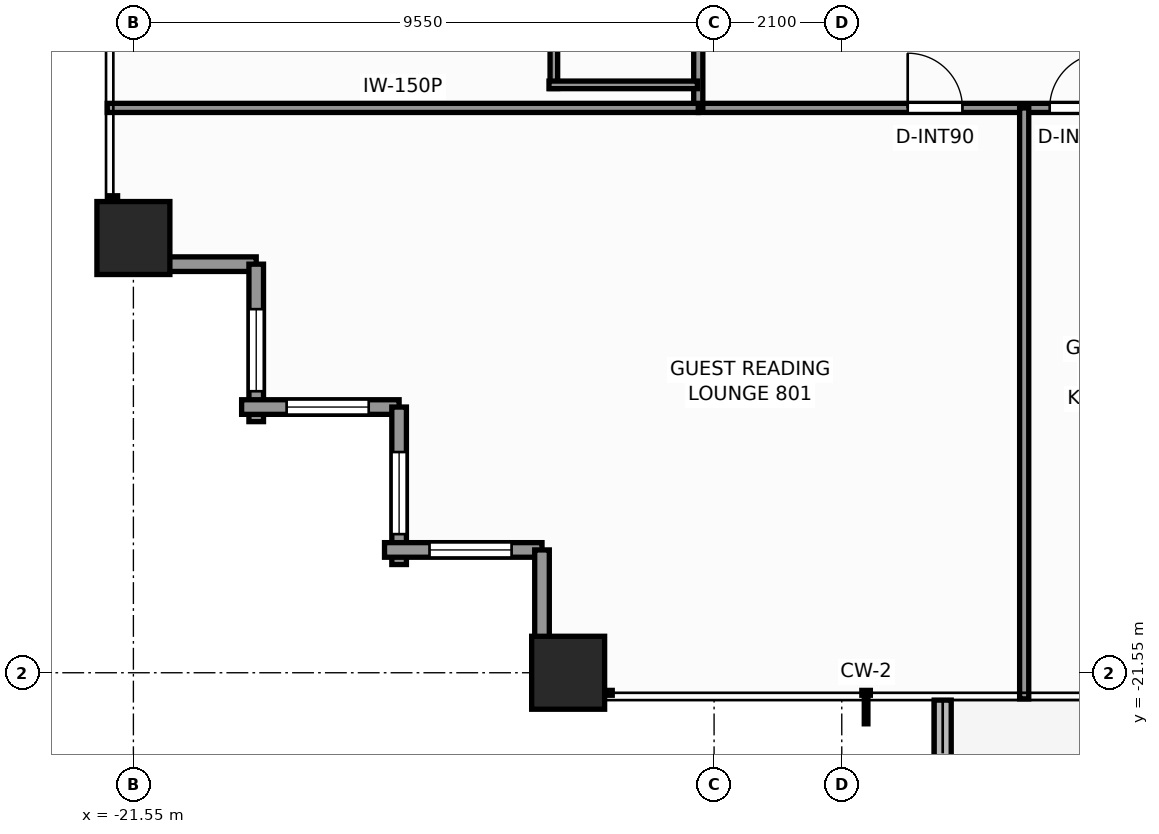
"""IFC4 building model, lengths in metres.
Left out: names, types, materials, properties, quantities, classifications, styles, units other than length and angle.
Written with IfcOpenShell. Run it as: python <this file> out.ifc"""

import sys

from ifc_helpers import new_model, si_unit, direction, frame, frame_2d, origin, origin_2d, place, context, subcontext, project, spatial, rectangle, extrude, element, fill, save


model = new_model("IFC4")
c1 = context("Model", 3, precision=1e-05, world=origin(), true_north=direction((0.0, 1.0)))
c2 = subcontext(c1, "Body", "Model", "MODEL_VIEW")
j1 = project(units=[si_unit("LENGTHUNIT", "METRE"), si_unit("PLANEANGLEUNIT", "RADIAN")], contexts=[c1])
p1 = place(None, origin())
s1 = spatial("IfcSite", under=j1, at=p1, CompositionType="ELEMENT")
p2 = place(p1, origin())
s2 = spatial("IfcBuilding", under=s1, at=p2, CompositionType="ELEMENT")
p3 = place(p2, frame((0.0, 0.0, 30.4)))
s3 = spatial("IfcBuildingStorey", under=s2, at=p3, CompositionType="ELEMENT", Elevation=30.4)
for number, where, z_axis, x_axis in (
    (1, (-14.4, -21.55, 0.0), (0.0, 0.0, 1.0), (1.0, 0.0, 0.0)),
    (2, (-21.55, -14.4, 0.0), (0.0, 0.0, 1.0), (1.0, 0.0, 0.0)),
):
    element("IfcColumn", number, at=place(p3, frame(where, z_axis=z_axis, x_axis=x_axis)), inside=s3, PredefinedType="COLUMN", context=c2, shape_type="SweptSolid", body=[
        extrude(rectangle(XDim=1.2, YDim=1.2, at=origin_2d()), origin(), (0.0, 0.0, 1.0), 3.3),
    ])
p4 = place(p3, frame((-8.24, -22.0, -0.06), z_axis=(0.0, 0.0, 1.0), x_axis=(0.0, -1.0, 0.0)))
e3 = element("IfcWall", 3, at=p4, inside=s3, PredefinedType="PARAPET", context=c2, shape_type="SweptSolid", body=[
    extrude(rectangle(XDim=2.674, YDim=0.28, at=frame_2d((1.337, 0.0))), origin(), (0.0, 0.0, 1.0), 0.42),
])
p5 = place(p3, frame((-19.53, -14.83, 0.0), z_axis=(0.0, 0.0, 1.0), x_axis=(-1.0, 0.0, 0.0)))
e4 = element("IfcWall", 4, at=p5, inside=s3, PredefinedType="STANDARD", context=c2, shape_type="SweptSolid", body=[
    extrude(rectangle(XDim=2.59, YDim=0.24, at=frame_2d((1.295, 0.0))), origin(), (0.0, 0.0, 1.0), 2.439),
])
p6 = place(p3, frame((-19.53, -17.42, 0.0), z_axis=(0.0, 0.0, 1.0), x_axis=(0.0, 1.0, 0.0)))
e5 = element("IfcWall", 5, at=p6, inside=s3, PredefinedType="STANDARD", context=c2, shape_type="SweptSolid", body=[
    extrude(rectangle(XDim=2.59, YDim=0.24, at=frame_2d((1.295, 0.0))), origin(), (0.0, 0.0, 1.0), 2.439),
])
p7 = place(p6, frame((0.5, 0.0, 0.65)))
e6 = element("IfcOpeningElement", 6, at=p7, cuts=e5, PredefinedType="OPENING", context=c2, shape_type="SweptSolid", body=[
    extrude(rectangle(XDim=1.35, YDim=1.55, at=frame_2d((0.675, 0.775))), frame((0.0, 0.13, 0.0), z_axis=(0.0, -1.0, 0.0), x_axis=(1.0, 0.0, 0.0)), (0.0, 0.0, 1.0), 0.26),
])
p8 = place(p3, frame((-17.18, -17.18, 0.0), z_axis=(0.0, 0.0, 1.0), x_axis=(-1.0, 0.0, 0.0)))
e7 = element("IfcWall", 7, at=p8, inside=s3, PredefinedType="STANDARD", context=c2, shape_type="SweptSolid", body=[
    extrude(rectangle(XDim=2.59, YDim=0.24, at=frame_2d((1.295, 0.0))), origin(), (0.0, 0.0, 1.0), 2.439),
])
p9 = place(p8, frame((0.5, 0.0, 0.65)))
e8 = element("IfcOpeningElement", 8, at=p9, cuts=e7, PredefinedType="OPENING", context=c2, shape_type="SweptSolid", body=[
    extrude(rectangle(XDim=1.35, YDim=1.55, at=frame_2d((0.675, 0.775))), frame((0.0, 0.13, 0.0), z_axis=(0.0, -1.0, 0.0), x_axis=(1.0, 0.0, 0.0)), (0.0, 0.0, 1.0), 0.26),
])
p10 = place(p3, frame((-17.18, -19.77, 0.0), z_axis=(0.0, 0.0, 1.0), x_axis=(0.0, 1.0, 0.0)))
e9 = element("IfcWall", 9, at=p10, inside=s3, PredefinedType="STANDARD", context=c2, shape_type="SweptSolid", body=[
    extrude(rectangle(XDim=2.59, YDim=0.24, at=frame_2d((1.295, 0.0))), origin(), (0.0, 0.0, 1.0), 2.439),
])
p11 = place(p10, frame((0.5, 0.0, 0.65)))
e10 = element("IfcOpeningElement", 10, at=p11, cuts=e9, PredefinedType="OPENING", context=c2, shape_type="SweptSolid", body=[
    extrude(rectangle(XDim=1.35, YDim=1.55, at=frame_2d((0.675, 0.775))), frame((0.0, 0.13, 0.0), z_axis=(0.0, -1.0, 0.0), x_axis=(1.0, 0.0, 0.0)), (0.0, 0.0, 1.0), 0.26),
])
p12 = place(p3, frame((-14.83, -19.53, 0.0), z_axis=(0.0, 0.0, 1.0), x_axis=(-1.0, 0.0, 0.0)))
e11 = element("IfcWall", 11, at=p12, inside=s3, PredefinedType="STANDARD", context=c2, shape_type="SweptSolid", body=[
    extrude(rectangle(XDim=2.59, YDim=0.24, at=frame_2d((1.295, 0.0))), origin(), (0.0, 0.0, 1.0), 2.439),
])
p13 = place(p12, frame((0.5, 0.0, 0.65)))
e12 = element("IfcOpeningElement", 12, at=p13, cuts=e11, PredefinedType="OPENING", context=c2, shape_type="SweptSolid", body=[
    extrude(rectangle(XDim=1.35, YDim=1.55, at=frame_2d((0.675, 0.775))), frame((0.0, 0.13, 0.0), z_axis=(0.0, -1.0, 0.0), x_axis=(1.0, 0.0, 0.0)), (0.0, 0.0, 1.0), 0.26),
])
p14 = place(p3, frame((-14.83, -22.12, 0.0), z_axis=(0.0, 0.0, 1.0), x_axis=(0.0, 1.0, 0.0)))
e13 = element("IfcWall", 13, at=p14, inside=s3, PredefinedType="STANDARD", context=c2, shape_type="SweptSolid", body=[
    extrude(rectangle(XDim=2.59, YDim=0.24, at=frame_2d((1.295, 0.0))), origin(), (0.0, 0.0, 1.0), 2.439),
])
p15 = place(p3, frame((-12.26, -12.26, 0.0), z_axis=(0.0, 0.0, 1.0), x_axis=(1.0, 0.0, 0.0)))
e14 = element("IfcWall", 14, at=p15, inside=s3, PredefinedType="PARTITIONING", context=c2, shape_type="SweptSolid", body=[
    extrude(rectangle(XDim=24.68, YDim=0.15, at=frame_2d((12.34, 0.0))), origin(), (0.0, 0.0, 1.0), 2.272),
])
p16 = place(p15, frame((3.444, 0.0, 0.0)))
e15 = element("IfcOpeningElement", 15, at=p16, cuts=e14, PredefinedType="OPENING", context=c2, shape_type="SweptSolid", body=[
    extrude(rectangle(XDim=0.9, YDim=2.06, at=frame_2d((0.45, 1.03))), frame((0.0, 0.085, 0.0), z_axis=(0.0, -1.0, 0.0), x_axis=(1.0, 0.0, 0.0)), (0.0, 0.0, 1.0), 0.17),
])
p17 = place(p15, frame((5.779, 0.0, 0.0)))
e16 = element("IfcOpeningElement", 16, at=p17, cuts=e14, PredefinedType="OPENING", context=c2, shape_type="SweptSolid", body=[
    extrude(rectangle(XDim=0.9, YDim=2.06, at=frame_2d((0.45, 1.03))), frame((0.0, 0.085, 0.0), z_axis=(0.0, -1.0, 0.0), x_axis=(1.0, 0.0, 0.0)), (0.0, 0.0, 1.0), 0.17),
])
p18 = place(p15, frame((13.551, 0.0, 0.0)))
e17 = element("IfcOpeningElement", 17, at=p18, cuts=e14, PredefinedType="OPENING", context=c2, shape_type="SweptSolid", body=[
    extrude(rectangle(XDim=0.9, YDim=2.06, at=frame_2d((0.45, 1.03))), frame((0.0, 0.085, 0.0), z_axis=(0.0, -1.0, 0.0), x_axis=(1.0, 0.0, 0.0)), (0.0, 0.0, 1.0), 0.17),
])
p19 = place(p15, frame((17.921, 0.0, 0.0)))
e18 = element("IfcOpeningElement", 18, at=p19, cuts=e14, PredefinedType="OPENING", context=c2, shape_type="SweptSolid", body=[
    extrude(rectangle(XDim=0.9, YDim=2.06, at=frame_2d((0.45, 1.03))), frame((0.0, 0.085, 0.0), z_axis=(0.0, -1.0, 0.0), x_axis=(1.0, 0.0, 0.0)), (0.0, 0.0, 1.0), 0.17),
])
p20 = place(p15, frame((20.256, 0.0, 0.0)))
e19 = element("IfcOpeningElement", 19, at=p20, cuts=e14, PredefinedType="OPENING", context=c2, shape_type="SweptSolid", body=[
    extrude(rectangle(XDim=0.9, YDim=2.06, at=frame_2d((0.45, 1.03))), frame((0.0, 0.085, 0.0), z_axis=(0.0, -1.0, 0.0), x_axis=(1.0, 0.0, 0.0)), (0.0, 0.0, 1.0), 0.17),
])
p21 = place(p3, frame((-12.26, -12.26, 0.0), z_axis=(0.0, 0.0, 1.0), x_axis=(0.0, 1.0, 0.0)))
e20 = element("IfcWall", 20, at=p21, inside=s3, PredefinedType="PARTITIONING", context=c2, shape_type="SweptSolid", body=[
    extrude(rectangle(XDim=24.84, YDim=0.15, at=frame_2d((12.42, 0.0))), origin(), (0.0, 0.0, 1.0), 2.272),
])
p22 = place(p21, frame((4.395, 0.0, 0.0)))
e21 = element("IfcOpeningElement", 21, at=p22, cuts=e20, PredefinedType="OPENING", context=c2, shape_type="SweptSolid", body=[
    extrude(rectangle(XDim=0.95, YDim=2.06, at=frame_2d((0.475, 1.03))), frame((0.0, 0.085, 0.0), z_axis=(0.0, -1.0, 0.0), x_axis=(1.0, 0.0, 0.0)), (0.0, 0.0, 1.0), 0.17),
])
p23 = place(p21, frame((13.815, 0.0, 0.0)))
e22 = element("IfcOpeningElement", 22, at=p23, cuts=e20, PredefinedType="OPENING", context=c2, shape_type="SweptSolid", body=[
    extrude(rectangle(XDim=0.95, YDim=2.06, at=frame_2d((0.475, 1.03))), frame((0.0, 0.085, 0.0), z_axis=(0.0, -1.0, 0.0), x_axis=(1.0, 0.0, 0.0)), (0.0, 0.0, 1.0), 0.17),
])
p24 = place(p21, frame((20.268, 0.0, 0.0)))
e23 = element("IfcOpeningElement", 23, at=p24, cuts=e20, PredefinedType="OPENING", context=c2, shape_type="SweptSolid", body=[
    extrude(rectangle(XDim=0.95, YDim=2.06, at=frame_2d((0.475, 1.03))), frame((0.0, 0.085, 0.0), z_axis=(0.0, -1.0, 0.0), x_axis=(1.0, 0.0, 0.0)), (0.0, 0.0, 1.0), 0.17),
])
p25 = place(p3, frame((-21.98, -12.26, 0.0), z_axis=(0.0, 0.0, 1.0), x_axis=(1.0, 0.0, 0.0)))
e24 = element("IfcWall", 24, at=p25, inside=s3, PredefinedType="PARTITIONING", context=c2, shape_type="SweptSolid", body=[
    extrude(rectangle(XDim=9.72, YDim=0.15, at=frame_2d((4.86, 0.0))), origin(), (0.0, 0.0, 1.0), 2.272),
])
p26 = place(p3, frame((-6.9, -21.98, 0.0), z_axis=(0.0, 0.0, 1.0), x_axis=(0.0, 1.0, 0.0)))
e25 = element("IfcWall", 25, at=p26, inside=s3, PredefinedType="PARTITIONING", context=c2, shape_type="SweptSolid", body=[
    extrude(rectangle(XDim=9.72, YDim=0.15, at=frame_2d((4.86, 0.0))), origin(), (0.0, 0.0, 1.0), 2.429),
])
p27 = place(p3, frame((-14.635, -11.941, 0.0), z_axis=(0.0, 0.0, 1.0), x_axis=(0.0, 1.0, 0.0)))
e26 = element("IfcWall", 26, at=p27, inside=s3, PredefinedType="PARTITIONING", context=c2, shape_type="SweptSolid", body=[
    extrude(rectangle(XDim=2.27, YDim=0.125, at=frame_2d((1.135, 0.0))), origin(), (0.0, 0.0, 1.0), 2.272),
])
p28 = place(p3, frame((-14.715, -11.881, 0.0), z_axis=(0.0, 0.0, 1.0), x_axis=(1.0, 0.0, 0.0)))
e27 = element("IfcWall", 27, at=p28, inside=s3, PredefinedType="PARTITIONING", context=c2, shape_type="SweptSolid", body=[
    extrude(rectangle(XDim=2.44, YDim=0.125, at=frame_2d((1.22, 0.0))), origin(), (0.0, 0.0, 1.0), 2.272),
])
p29 = place(p7, origin())
e28 = element("IfcWindow", 28, at=p29, inside=s3, PartitioningType="SINGLE_PANEL", PredefinedType="WINDOW", context=c2, shape_type="SweptSolid", body=[
    extrude(rectangle(XDim=1.35, YDim=1.55, at=frame_2d((0.675, 0.775))), frame((0.0, 0.03, 0.0), z_axis=(0.0, -1.0, 0.0), x_axis=(1.0, 0.0, 0.0)), (0.0, 0.0, 1.0), 0.06),
])
fill(e6, e28)
p30 = place(p9, origin())
e29 = element("IfcWindow", 29, at=p30, inside=s3, PartitioningType="SINGLE_PANEL", PredefinedType="WINDOW", context=c2, shape_type="SweptSolid", body=[
    extrude(rectangle(XDim=1.35, YDim=1.55, at=frame_2d((0.675, 0.775))), frame((0.0, 0.03, 0.0), z_axis=(0.0, -1.0, 0.0), x_axis=(1.0, 0.0, 0.0)), (0.0, 0.0, 1.0), 0.06),
])
fill(e8, e29)
p31 = place(p11, origin())
e30 = element("IfcWindow", 30, at=p31, inside=s3, PartitioningType="SINGLE_PANEL", PredefinedType="WINDOW", context=c2, shape_type="SweptSolid", body=[
    extrude(rectangle(XDim=1.35, YDim=1.55, at=frame_2d((0.675, 0.775))), frame((0.0, 0.03, 0.0), z_axis=(0.0, -1.0, 0.0), x_axis=(1.0, 0.0, 0.0)), (0.0, 0.0, 1.0), 0.06),
])
fill(e10, e30)
p32 = place(p13, origin())
e31 = element("IfcWindow", 31, at=p32, inside=s3, PartitioningType="SINGLE_PANEL", PredefinedType="WINDOW", context=c2, shape_type="SweptSolid", body=[
    extrude(rectangle(XDim=1.35, YDim=1.55, at=frame_2d((0.675, 0.775))), frame((0.0, 0.03, 0.0), z_axis=(0.0, -1.0, 0.0), x_axis=(1.0, 0.0, 0.0)), (0.0, 0.0, 1.0), 0.06),
])
fill(e12, e31)
p33 = place(p16, origin())
e32 = element("IfcDoor", 32, at=p33, inside=s3, OperationType="SINGLE_SWING_LEFT", PredefinedType="DOOR", context=c2, shape_type="SweptSolid", body=[
    extrude(rectangle(XDim=0.9, YDim=2.06, at=frame_2d((0.45, 1.03))), frame((0.0, 0.025, 0.0), z_axis=(0.0, -1.0, 0.0), x_axis=(1.0, 0.0, 0.0)), (0.0, 0.0, 1.0), 0.05),
])
fill(e15, e32)
p34 = place(p17, origin())
e33 = element("IfcDoor", 33, at=p34, inside=s3, OperationType="SINGLE_SWING_RIGHT", PredefinedType="DOOR", context=c2, shape_type="SweptSolid", body=[
    extrude(rectangle(XDim=0.9, YDim=2.06, at=frame_2d((0.45, 1.03))), frame((0.0, 0.025, 0.0), z_axis=(0.0, -1.0, 0.0), x_axis=(1.0, 0.0, 0.0)), (0.0, 0.0, 1.0), 0.05),
])
fill(e16, e33)
save(model, sys.argv[1])
